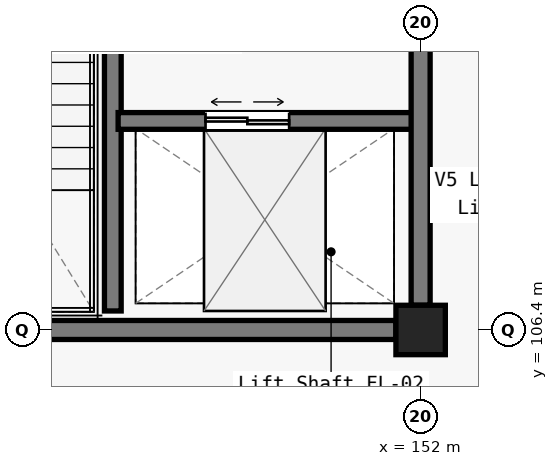
"""IFC4 building model, lengths in metres.
Left out: names, types, materials, properties, quantities, classifications, styles, units other than length and angle.
Written with IfcOpenShell. Run it as: python <this file> out.ifc"""

import sys

from ifc_helpers import new_model, si_unit, direction, frame, frame_2d, origin, origin_2d, place, context, subcontext, project, spatial, rectangle, circle, extrude, element, fill, save


model = new_model("IFC4")
c1 = context("Model", 3, precision=1e-05, world=origin(), true_north=direction((0.0, 1.0)))
c2 = subcontext(c1, "Body", "Model", "MODEL_VIEW")
j1 = project(units=[si_unit("LENGTHUNIT", "METRE"), si_unit("PLANEANGLEUNIT", "RADIAN")], contexts=[c1])
p1 = place(None, origin())
s1 = spatial("IfcSite", under=j1, at=p1, CompositionType="ELEMENT")
p2 = place(p1, origin())
s2 = spatial("IfcBuilding", under=s1, at=p2, CompositionType="ELEMENT")
p3 = place(p2, origin())
s3 = spatial("IfcBuildingStorey", under=s2, at=p3, CompositionType="ELEMENT", Elevation=0.0)
p4 = place(p3, frame((152.0, 106.4, 0.0), z_axis=(0.0, 0.0, 1.0), x_axis=(1.0, 0.0, 0.0)))
e1 = element("IfcColumn", 1, at=p4, inside=s3, PredefinedType="COLUMN", context=c2, shape_type="SweptSolid", body=[
    extrude(circle(Radius=0.325, at=origin_2d()), origin(), (0.0, 0.0, 1.0), 5.4),
])
p5 = place(p3, frame((144.4, 106.4, 0.0), z_axis=(0.0, 0.0, 1.0), x_axis=(1.0, 0.0, 0.0)))
e2 = element("IfcWall", 2, at=p5, inside=s3, PredefinedType="SOLIDWALL", context=c2, shape_type="SweptSolid", body=[
    extrude(rectangle(XDim=7.275, YDim=0.25, at=frame_2d((3.638, 0.0))), origin(), (0.0, 0.0, 1.0), 4.14),
])
p6 = place(p3, frame((147.95, 106.65, 0.0), z_axis=(0.0, 0.0, 1.0), x_axis=(0.0, 1.0, 0.0)))
e3 = element("IfcWall", 3, at=p6, inside=s3, PredefinedType="SOLIDWALL", context=c2, shape_type="SweptSolid", body=[
    extrude(rectangle(XDim=7.1, YDim=0.22, at=frame_2d((3.55, 0.0))), origin(), (0.0, 0.0, 1.0), 5.1),
])
p7 = place(p6, frame((5.55, 0.0, 0.0)))
e4 = element("IfcOpeningElement", 4, at=p7, cuts=e3, PredefinedType="OPENING", context=c2, shape_type="SweptSolid", body=[
    extrude(rectangle(XDim=1.2, YDim=2.15, at=frame_2d((0.6, 1.075))), frame((0.0, 0.12, 0.0), z_axis=(0.0, -1.0, 0.0), x_axis=(1.0, 0.0, 0.0)), (0.0, 0.0, 1.0), 0.24),
])
p8 = place(p3, frame((148.02, 109.15, 0.0), z_axis=(0.0, 0.0, 1.0), x_axis=(1.0, 0.0, 0.0)))
e5 = element("IfcWall", 5, at=p8, inside=s3, PredefinedType="SOLIDWALL", context=c2, shape_type="SweptSolid", body=[
    extrude(rectangle(XDim=3.93, YDim=0.22, at=frame_2d((1.965, 0.0))), origin(), (0.0, 0.0, 1.0), 4.45),
])
p9 = place(p8, frame((1.15, 0.0, 0.0)))
e6 = element("IfcOpeningElement", 6, at=p9, cuts=e5, PredefinedType="OPENING", context=c2, shape_type="SweptSolid", body=[
    extrude(rectangle(XDim=1.1, YDim=2.2, at=frame_2d((0.55, 1.1))), frame((0.0, 0.12, 0.0), z_axis=(0.0, -1.0, 0.0), x_axis=(1.0, 0.0, 0.0)), (0.0, 0.0, 1.0), 0.24),
])
p10 = place(p3, frame((152.0, 106.725, 0.0), z_axis=(0.0, 0.0, 1.0), x_axis=(0.0, 1.0, 0.0)))
e7 = element("IfcWall", 7, at=p10, inside=s3, PredefinedType="SOLIDWALL", context=c2, shape_type="SweptSolid", body=[
    extrude(rectangle(XDim=6.875, YDim=0.25, at=frame_2d((3.438, 0.0))), origin(), (0.0, 0.0, 1.0), 4.275),
])
p11 = place(p10, frame((3.525, 0.0, 0.0)))
e8 = element("IfcOpeningElement", 8, at=p11, cuts=e7, PredefinedType="OPENING", context=c2, shape_type="SweptSolid", body=[
    extrude(rectangle(XDim=1.35, YDim=2.2, at=frame_2d((0.675, 1.1))), frame((0.0, 0.135, 0.0), z_axis=(0.0, -1.0, 0.0), x_axis=(1.0, 0.0, 0.0)), (0.0, 0.0, 1.0), 0.27),
])
p12 = place(p9, origin())
e9 = element("IfcDoor", 9, at=p12, inside=s3, OperationType="DOUBLE_DOOR_SLIDING", PredefinedType="DOOR", context=c2, shape_type="SweptSolid", body=[
    extrude(rectangle(XDim=1.1, YDim=2.2, at=frame_2d((0.55, 1.1))), frame((0.0, 0.025, 0.0), z_axis=(0.0, -1.0, 0.0), x_axis=(1.0, 0.0, 0.0)), (0.0, 0.0, 1.0), 0.05),
])
fill(e6, e9)
save(model, sys.argv[1])
